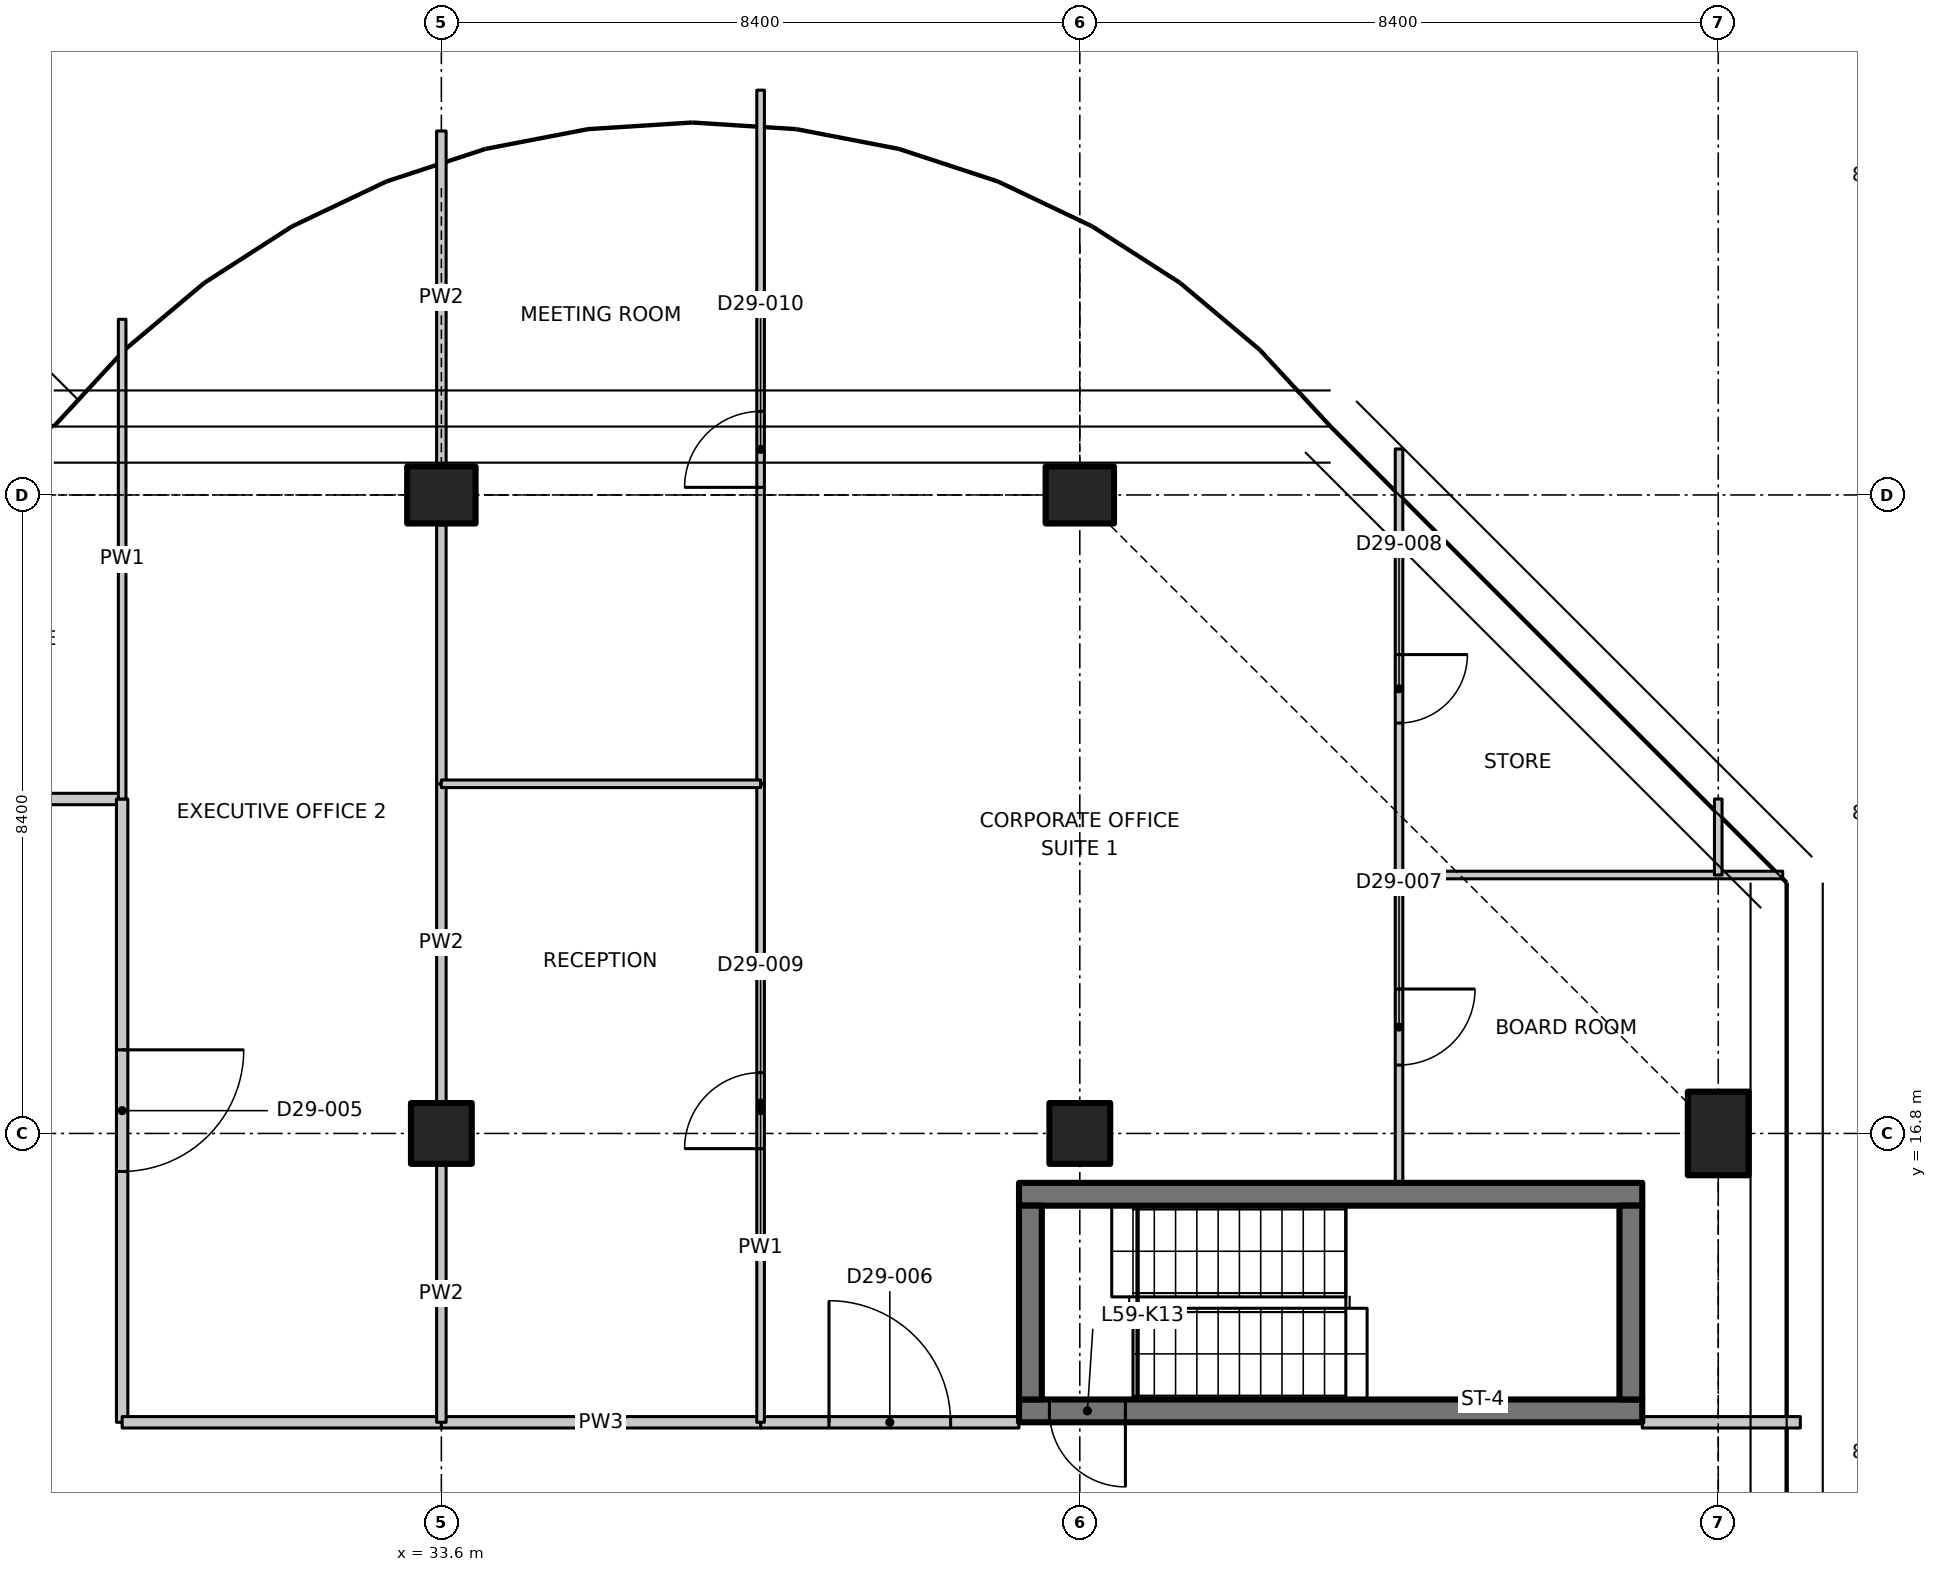
"""IFC4 building model, lengths in metres.
Left out: names, types, materials, properties, quantities, classifications, styles, units other than length and angle.
Written with IfcOpenShell. Run it as: python <this file> out.ifc"""

import sys

from ifc_helpers import new_model, si_unit, direction, frame, frame_2d, origin, origin_2d, place, context, subcontext, project, spatial, polyline, rectangle, outline, extrude, element, fill, save


model = new_model("IFC4")
c1 = context("Model", 3, precision=1e-05, world=origin(), true_north=direction((0.0, 1.0)))
c2 = subcontext(c1, "Body", "Model", "MODEL_VIEW")
j1 = project(units=[si_unit("LENGTHUNIT", "METRE"), si_unit("PLANEANGLEUNIT", "RADIAN")], contexts=[c1])
p1 = place(None, origin())
s1 = spatial("IfcSite", under=j1, at=p1, CompositionType="ELEMENT")
p2 = place(p1, origin())
s2 = spatial("IfcBuilding", under=s1, at=p2, CompositionType="ELEMENT")
p3 = place(p2, frame((0.0, 0.0, 233.7)))
s3 = spatial("IfcBuildingStorey", under=s2, at=p3, CompositionType="ELEMENT", Elevation=233.7)
p4 = place(p3, frame((33.6, 16.8, 0.0), z_axis=(0.0, 0.0, 1.0), x_axis=(1.0, 0.0, 0.0)))
e1 = element("IfcColumn", 1, at=p4, inside=s3, PredefinedType="COLUMN", context=c2, shape_type="SweptSolid", body=[
    extrude(rectangle(XDim=0.8, YDim=0.8, at=origin_2d()), origin(), (0.0, 0.0, 1.0), 3.35),
])
p5 = place(p3, frame((33.6, 25.2, 0.0), z_axis=(0.0, 0.0, 1.0), x_axis=(0.0, 1.0, 0.0)))
e2 = element("IfcColumn", 2, at=p5, inside=s3, PredefinedType="COLUMN", context=c2, shape_type="SweptSolid", body=[
    extrude(rectangle(XDim=0.75, YDim=0.9, at=origin_2d()), origin(), (0.0, 0.0, 1.0), 3.35),
])
p6 = place(p3, frame((42.0, 16.8, 0.0), z_axis=(0.0, 0.0, 1.0), x_axis=(1.0, 0.0, 0.0)))
e3 = element("IfcColumn", 3, at=p6, inside=s3, PredefinedType="COLUMN", context=c2, shape_type="SweptSolid", body=[
    extrude(rectangle(XDim=0.8, YDim=0.8, at=origin_2d()), origin(), (0.0, 0.0, 1.0), 3.35),
])
p7 = place(p3, frame((42.0, 25.2, 0.0), z_axis=(0.0, 0.0, 1.0), x_axis=(0.0, 1.0, 0.0)))
e4 = element("IfcColumn", 4, at=p7, inside=s3, PredefinedType="COLUMN", context=c2, shape_type="SweptSolid", body=[
    extrude(rectangle(XDim=0.75, YDim=0.9, at=origin_2d()), origin(), (0.0, 0.0, 1.0), 3.35),
])
p8 = place(p3, frame((50.4, 16.8, 0.0), z_axis=(0.0, 0.0, 1.0), x_axis=(1.0, 0.0, 0.0)))
e5 = element("IfcColumn", 5, at=p8, inside=s3, PredefinedType="COLUMN", context=c2, shape_type="SweptSolid", body=[
    extrude(rectangle(XDim=0.8, YDim=1.1, at=origin_2d()), origin(), (0.0, 0.0, 1.0), 3.35),
])
p9 = place(p3, frame((49.4, 13.15, 0.0), z_axis=(0.0, 0.0, 1.0), x_axis=(-1.0, 0.0, 0.0)))
e6 = element("IfcWall", 6, at=p9, inside=s3, PredefinedType="SHEAR", context=c2, shape_type="SweptSolid", body=[
    extrude(rectangle(XDim=8.2, YDim=0.3, at=frame_2d((4.1, 0.0))), origin(), (0.0, 0.0, 1.0), 3.35),
])
p10 = place(p9, frame((6.8, 0.0, 0.0)))
e7 = element("IfcOpeningElement", 7, at=p10, cuts=e6, PredefinedType="OPENING", context=c2, shape_type="SweptSolid", body=[
    extrude(rectangle(XDim=1.0, YDim=2.1, at=frame_2d((0.5, 1.05))), frame((0.0, 0.16, 0.0), z_axis=(0.0, -1.0, 0.0), x_axis=(1.0, 0.0, 0.0)), (0.0, 0.0, 1.0), 0.32),
])
p11 = place(p3, frame((41.2, 16.0, 0.0), z_axis=(0.0, 0.0, 1.0), x_axis=(1.0, 0.0, 0.0)))
e8 = element("IfcWall", 8, at=p11, inside=s3, PredefinedType="SHEAR", context=c2, shape_type="SweptSolid", body=[
    extrude(rectangle(XDim=8.2, YDim=0.3, at=frame_2d((4.1, 0.0))), origin(), (0.0, 0.0, 1.0), 3.35),
])
for number, where, z_axis, x_axis in (
    (9, (41.35, 13.3, 0.0), (0.0, 0.0, 1.0), (0.0, 1.0, 0.0)),
    (10, (49.25, 13.3, 0.0), (0.0, 0.0, 1.0), (0.0, 1.0, 0.0)),
):
    element("IfcWall", number, at=place(p3, frame(where, z_axis=z_axis, x_axis=x_axis)), inside=s3, PredefinedType="SHEAR", context=c2, shape_type="SweptSolid", body=[
        extrude(rectangle(XDim=2.55, YDim=0.3, at=frame_2d((1.275, 0.0))), origin(), (0.0, 0.0, 1.0), 3.35),
    ])
p12 = place(p3, frame((25.2, 21.2, 0.0), z_axis=(0.0, 0.0, 1.0), x_axis=(1.0, 0.0, 0.0)))
e11 = element("IfcWall", 11, at=p12, inside=s3, PredefinedType="PARTITIONING", context=c2, shape_type="SweptSolid", body=[
    extrude(rectangle(XDim=4.2, YDim=0.15, at=frame_2d((2.1, 0.0))), origin(), (0.0, 0.0, 1.0), 3.33),
])
p13 = place(p12, frame((1.5, 0.0, 0.0)))
e12 = element("IfcOpeningElement", 12, at=p13, cuts=e11, PredefinedType="OPENING", context=c2, shape_type="SweptSolid", body=[
    extrude(rectangle(XDim=1.0, YDim=2.1, at=frame_2d((0.5, 1.05))), frame((0.0, 0.085, 0.0), z_axis=(0.0, -1.0, 0.0), x_axis=(1.0, 0.0, 0.0)), (0.0, 0.0, 1.0), 0.17),
])
p14 = place(p3, frame((29.4, 21.2, 0.0), z_axis=(0.0, 0.0, 1.0), x_axis=(0.0, -1.0, 0.0)))
e13 = element("IfcWall", 13, at=p14, inside=s3, PredefinedType="PARTITIONING", context=c2, shape_type="SweptSolid", body=[
    extrude(rectangle(XDim=8.2, YDim=0.15, at=frame_2d((4.1, 0.0))), origin(), (0.0, 0.0, 1.0), 3.33),
])
p15 = place(p14, frame((3.3, 0.0, 0.0)))
e14 = element("IfcOpeningElement", 14, at=p15, cuts=e13, PredefinedType="OPENING", context=c2, shape_type="SweptSolid", body=[
    extrude(rectangle(XDim=1.6, YDim=2.1, at=frame_2d((0.8, 1.05))), frame((0.0, 0.085, 0.0), z_axis=(0.0, -1.0, 0.0), x_axis=(1.0, 0.0, 0.0)), (0.0, 0.0, 1.0), 0.17),
])
p16 = place(p3, frame((29.4, 27.511, 0.0), z_axis=(0.0, 0.0, 1.0), x_axis=(0.0, -1.0, 0.0)))
e15 = element("IfcWall", 15, at=p16, inside=s3, PredefinedType="PARTITIONING", context=c2, shape_type="SweptSolid", body=[
    extrude(outline(polyline([(0.0, 0.0), (6.311, 0.0), (6.311, 3.33), (2.761, 3.33), (2.759, 2.98), (1.863, 2.98), (1.861, 3.33), (0.236, 3.33), (0.0, 3.33), (0.0, 0.0)])), frame((0.0, 0.05, 0.0), z_axis=(0.0, -1.0, 0.0), x_axis=(1.0, 0.0, 0.0)), (0.0, 0.0, 1.0), 0.1),
])
p17 = place(p3, frame((29.4, 13.0, 0.0), z_axis=(0.0, 0.0, 1.0), x_axis=(1.0, 0.0, 0.0)))
e16 = element("IfcWall", 16, at=p17, inside=s3, PredefinedType="PARTITIONING", context=c2, shape_type="SweptSolid", body=[
    extrude(rectangle(XDim=4.2, YDim=0.15, at=frame_2d((2.1, 0.0))), origin(), (0.0, 0.0, 1.0), 3.33),
])
p18 = place(p3, frame((37.8, 13.0, 0.0), z_axis=(0.0, 0.0, 1.0), x_axis=(1.0, 0.0, 0.0)))
e17 = element("IfcWall", 17, at=p18, inside=s3, PredefinedType="PARTITIONING", context=c2, shape_type="SweptSolid", body=[
    extrude(rectangle(XDim=3.4, YDim=0.15, at=frame_2d((1.7, 0.0))), origin(), (0.0, 0.0, 1.0), 3.33),
])
p19 = place(p18, frame((0.9, 0.0, 0.0)))
e18 = element("IfcOpeningElement", 18, at=p19, cuts=e17, PredefinedType="OPENING", context=c2, shape_type="SweptSolid", body=[
    extrude(rectangle(XDim=1.6, YDim=2.1, at=frame_2d((0.8, 1.05))), frame((0.0, 0.085, 0.0), z_axis=(0.0, -1.0, 0.0), x_axis=(1.0, 0.0, 0.0)), (0.0, 0.0, 1.0), 0.17),
])
p20 = place(p3, frame((49.4, 13.0, 0.0), z_axis=(0.0, 0.0, 1.0), x_axis=(1.0, 0.0, 0.0)))
e19 = element("IfcWall", 19, at=p20, inside=s3, PredefinedType="PARTITIONING", context=c2, shape_type="SweptSolid", body=[
    extrude(rectangle(XDim=2.08, YDim=0.15, at=frame_2d((1.04, 0.0))), origin(), (0.0, 0.0, 1.0), 2.98),
])
p21 = place(p3, frame((33.6, 13.0, 0.0), z_axis=(0.0, 0.0, 1.0), x_axis=(1.0, 0.0, 0.0)))
e20 = element("IfcWall", 20, at=p21, inside=s3, PredefinedType="PARTITIONING", context=c2, shape_type="SweptSolid", body=[
    extrude(rectangle(XDim=4.2, YDim=0.15, at=frame_2d((2.1, 0.0))), origin(), (0.0, 0.0, 1.0), 3.33),
])
p22 = place(p3, frame((33.6, 21.4, 0.0), z_axis=(0.0, 0.0, 1.0), x_axis=(0.0, -1.0, 0.0)))
e21 = element("IfcWall", 21, at=p22, inside=s3, PredefinedType="PARTITIONING", context=c2, shape_type="SweptSolid", body=[
    extrude(rectangle(XDim=4.18, YDim=0.125, at=frame_2d((2.09, 0.0))), origin(), (0.0, 0.0, 1.0), 3.33),
])
p23 = place(p3, frame((33.6, 16.38, 0.0), z_axis=(0.0, 0.0, 1.0), x_axis=(0.0, -1.0, 0.0)))
e22 = element("IfcWall", 22, at=p23, inside=s3, PredefinedType="PARTITIONING", context=c2, shape_type="SweptSolid", body=[
    extrude(rectangle(XDim=3.38, YDim=0.125, at=frame_2d((1.69, 0.0))), origin(), (0.0, 0.0, 1.0), 3.33),
])
p24 = place(p3, frame((33.6, 29.988, 0.0), z_axis=(0.0, 0.0, 1.0), x_axis=(0.0, -1.0, 0.0)))
e23 = element("IfcWall", 23, at=p24, inside=s3, PredefinedType="PARTITIONING", context=c2, shape_type="SweptSolid", body=[
    extrude(rectangle(XDim=4.393, YDim=0.125, at=frame_2d((2.197, 0.0))), origin(), (0.0, 0.0, 1.0), 2.98),
])
p25 = place(p3, frame((33.6, 24.805, 0.0), z_axis=(0.0, 0.0, 1.0), x_axis=(0.0, -1.0, 0.0)))
e24 = element("IfcWall", 24, at=p25, inside=s3, PredefinedType="PARTITIONING", context=c2, shape_type="SweptSolid", body=[
    extrude(rectangle(XDim=3.405, YDim=0.125, at=frame_2d((1.703, 0.0))), origin(), (0.0, 0.0, 1.0), 2.98),
])
p26 = place(p3, frame((46.2, 20.2, 0.0), z_axis=(0.0, 0.0, 1.0), x_axis=(0.0, -1.0, 0.0)))
e25 = element("IfcWall", 25, at=p26, inside=s3, PredefinedType="PARTITIONING", context=c2, shape_type="SweptSolid", body=[
    extrude(rectangle(XDim=4.05, YDim=0.1, at=frame_2d((2.025, 0.0))), origin(), (0.0, 0.0, 1.0), 3.33),
])
p27 = place(p26, frame((1.5, 0.0, 0.0)))
e26 = element("IfcOpeningElement", 26, at=p27, cuts=e25, PredefinedType="OPENING", context=c2, shape_type="SweptSolid", body=[
    extrude(rectangle(XDim=1.0, YDim=2.1, at=frame_2d((0.5, 1.05))), frame((0.0, 0.06, 0.0), z_axis=(0.0, -1.0, 0.0), x_axis=(1.0, 0.0, 0.0)), (0.0, 0.0, 1.0), 0.12),
])
p28 = place(p3, frame((46.2, 25.805, 0.0), z_axis=(0.0, 0.0, 1.0), x_axis=(0.0, -1.0, 0.0)))
e27 = element("IfcWall", 27, at=p28, inside=s3, PredefinedType="PARTITIONING", context=c2, shape_type="SweptSolid", body=[
    extrude(outline(polyline([(0.0, 0.0), (5.605, 0.0), (5.605, 3.33), (5.471, 3.33), (5.469, 2.98), (4.142, 2.98), (4.14, 3.33), (0.406, 3.33), (0.0, 3.33), (0.0, 0.0)])), frame((0.0, 0.05, 0.0), z_axis=(0.0, -1.0, 0.0), x_axis=(1.0, 0.0, 0.0)), (0.0, 0.0, 1.0), 0.1),
])
p29 = place(p28, frame((2.705, 0.0, 0.0)))
e28 = element("IfcOpeningElement", 28, at=p29, cuts=e27, PredefinedType="OPENING", context=c2, shape_type="SweptSolid", body=[
    extrude(rectangle(XDim=0.9, YDim=2.1, at=frame_2d((0.45, 1.05))), frame((0.0, 0.06, 0.0), z_axis=(0.0, -1.0, 0.0), x_axis=(1.0, 0.0, 0.0)), (0.0, 0.0, 1.0), 0.12),
])
p30 = place(p3, frame((37.8, 13.0, 0.0), z_axis=(0.0, 0.0, 1.0), x_axis=(0.0, 1.0, 0.0)))
e29 = element("IfcWall", 29, at=p30, inside=s3, PredefinedType="PARTITIONING", context=c2, shape_type="SweptSolid", body=[
    extrude(rectangle(XDim=8.4, YDim=0.1, at=frame_2d((4.2, 0.0))), origin(), (0.0, 0.0, 1.0), 3.33),
])
p31 = place(p30, frame((3.6, 0.0, 0.0)))
e30 = element("IfcOpeningElement", 30, at=p31, cuts=e29, PredefinedType="OPENING", context=c2, shape_type="SweptSolid", body=[
    extrude(rectangle(XDim=1.0, YDim=2.1, at=frame_2d((0.5, 1.05))), frame((0.0, 0.06, 0.0), z_axis=(0.0, -1.0, 0.0), x_axis=(1.0, 0.0, 0.0)), (0.0, 0.0, 1.0), 0.12),
])
p32 = place(p3, frame((37.8, 21.4, 0.0), z_axis=(0.0, 0.0, 1.0), x_axis=(0.0, 1.0, 0.0)))
e31 = element("IfcWall", 31, at=p32, inside=s3, PredefinedType="PARTITIONING", context=c2, shape_type="SweptSolid", body=[
    extrude(outline(polyline([(0.0, 0.0), (9.126, 0.0), (9.126, 3.33), (8.843, 3.33), (4.25, 3.33), (4.248, 2.98), (3.352, 2.98), (3.35, 3.33), (0.0, 3.33), (0.0, 0.0)])), frame((0.0, 0.05, 0.0), z_axis=(0.0, -1.0, 0.0), x_axis=(1.0, 0.0, 0.0)), (0.0, 0.0, 1.0), 0.1),
])
p33 = place(p32, frame((3.9, 0.0, 0.0)))
e32 = element("IfcOpeningElement", 32, at=p33, cuts=e31, PredefinedType="OPENING", context=c2, shape_type="SweptSolid", body=[
    extrude(rectangle(XDim=1.0, YDim=2.1, at=frame_2d((0.5, 1.05))), frame((0.0, 0.06, 0.0), z_axis=(0.0, -1.0, 0.0), x_axis=(1.0, 0.0, 0.0)), (0.0, 0.0, 1.0), 0.12),
])
p34 = place(p3, frame((46.2, 20.2, 0.0), z_axis=(0.0, 0.0, 1.0), x_axis=(1.0, 0.0, 0.0)))
e33 = element("IfcWall", 33, at=p34, inside=s3, PredefinedType="PARTITIONING", context=c2, shape_type="SweptSolid", body=[
    extrude(rectangle(XDim=5.048, YDim=0.1, at=frame_2d((2.524, 0.0))), origin(), (0.0, 0.0, 1.0), 2.98),
])
p35 = place(p3, frame((50.4, 20.2, 0.0), z_axis=(0.0, 0.0, 1.0), x_axis=(0.0, 1.0, 0.0)))
e34 = element("IfcWall", 34, at=p35, inside=s3, PredefinedType="PARTITIONING", context=c2, shape_type="SweptSolid", body=[
    extrude(rectangle(XDim=1.0, YDim=0.1, at=frame_2d((0.5, 0.0))), origin(), (0.0, 0.0, 1.0), 3.33),
])
p36 = place(p3, frame((33.6, 21.4, 0.0), z_axis=(0.0, 0.0, 1.0), x_axis=(1.0, 0.0, 0.0)))
e35 = element("IfcWall", 35, at=p36, inside=s3, PredefinedType="PARTITIONING", context=c2, shape_type="SweptSolid", body=[
    extrude(rectangle(XDim=4.2, YDim=0.1, at=frame_2d((2.1, 0.0))), origin(), (0.0, 0.0, 1.0), 3.33),
])
p37 = place(p10, origin())
e36 = element("IfcDoor", 36, at=p37, inside=s3, OperationType="SINGLE_SWING_RIGHT", PredefinedType="DOOR", context=c2, shape_type="SweptSolid", body=[
    extrude(rectangle(XDim=1.0, YDim=2.1, at=frame_2d((0.5, 1.05))), frame((0.0, 0.025, 0.0), z_axis=(0.0, -1.0, 0.0), x_axis=(1.0, 0.0, 0.0)), (0.0, 0.0, 1.0), 0.05),
])
fill(e7, e36)
p38 = place(p15, origin())
e37 = element("IfcDoor", 37, at=p38, inside=s3, OperationType="DOUBLE_DOOR_SINGLE_SWING", PredefinedType="DOOR", context=c2, shape_type="SweptSolid", body=[
    extrude(rectangle(XDim=1.6, YDim=2.1, at=frame_2d((0.8, 1.05))), frame((0.0, 0.025, 0.0), z_axis=(0.0, -1.0, 0.0), x_axis=(1.0, 0.0, 0.0)), (0.0, 0.0, 1.0), 0.05),
])
fill(e14, e37)
p39 = place(p19, origin())
e38 = element("IfcDoor", 38, at=p39, inside=s3, OperationType="DOUBLE_DOOR_SINGLE_SWING", PredefinedType="DOOR", context=c2, shape_type="SweptSolid", body=[
    extrude(rectangle(XDim=1.6, YDim=2.1, at=frame_2d((0.8, 1.05))), frame((0.0, 0.025, 0.0), z_axis=(0.0, -1.0, 0.0), x_axis=(1.0, 0.0, 0.0)), (0.0, 0.0, 1.0), 0.05),
])
fill(e18, e38)
p40 = place(p27, origin())
e39 = element("IfcDoor", 39, at=p40, inside=s3, OperationType="SINGLE_SWING_LEFT", PredefinedType="DOOR", context=c2, shape_type="SweptSolid", body=[
    extrude(rectangle(XDim=1.0, YDim=2.1, at=frame_2d((0.5, 1.05))), frame((0.0, 0.025, 0.0), z_axis=(0.0, -1.0, 0.0), x_axis=(1.0, 0.0, 0.0)), (0.0, 0.0, 1.0), 0.05),
])
fill(e26, e39)
p41 = place(p29, origin())
e40 = element("IfcDoor", 40, at=p41, inside=s3, OperationType="SINGLE_SWING_LEFT", PredefinedType="DOOR", context=c2, shape_type="SweptSolid", body=[
    extrude(rectangle(XDim=0.9, YDim=2.1, at=frame_2d((0.45, 1.05))), frame((0.0, 0.025, 0.0), z_axis=(0.0, -1.0, 0.0), x_axis=(1.0, 0.0, 0.0)), (0.0, 0.0, 1.0), 0.05),
])
fill(e28, e40)
p42 = place(p31, origin())
e41 = element("IfcDoor", 41, at=p42, inside=s3, OperationType="SINGLE_SWING_LEFT", PredefinedType="DOOR", context=c2, shape_type="SweptSolid", body=[
    extrude(rectangle(XDim=1.0, YDim=2.1, at=frame_2d((0.5, 1.05))), frame((0.0, 0.025, 0.0), z_axis=(0.0, -1.0, 0.0), x_axis=(1.0, 0.0, 0.0)), (0.0, 0.0, 1.0), 0.05),
])
fill(e30, e41)
p43 = place(p33, origin())
e42 = element("IfcDoor", 42, at=p43, inside=s3, OperationType="SINGLE_SWING_LEFT", PredefinedType="DOOR", context=c2, shape_type="SweptSolid", body=[
    extrude(rectangle(XDim=1.0, YDim=2.1, at=frame_2d((0.5, 1.05))), frame((0.0, 0.025, 0.0), z_axis=(0.0, -1.0, 0.0), x_axis=(1.0, 0.0, 0.0)), (0.0, 0.0, 1.0), 0.05),
])
fill(e32, e42)
save(model, sys.argv[1])
